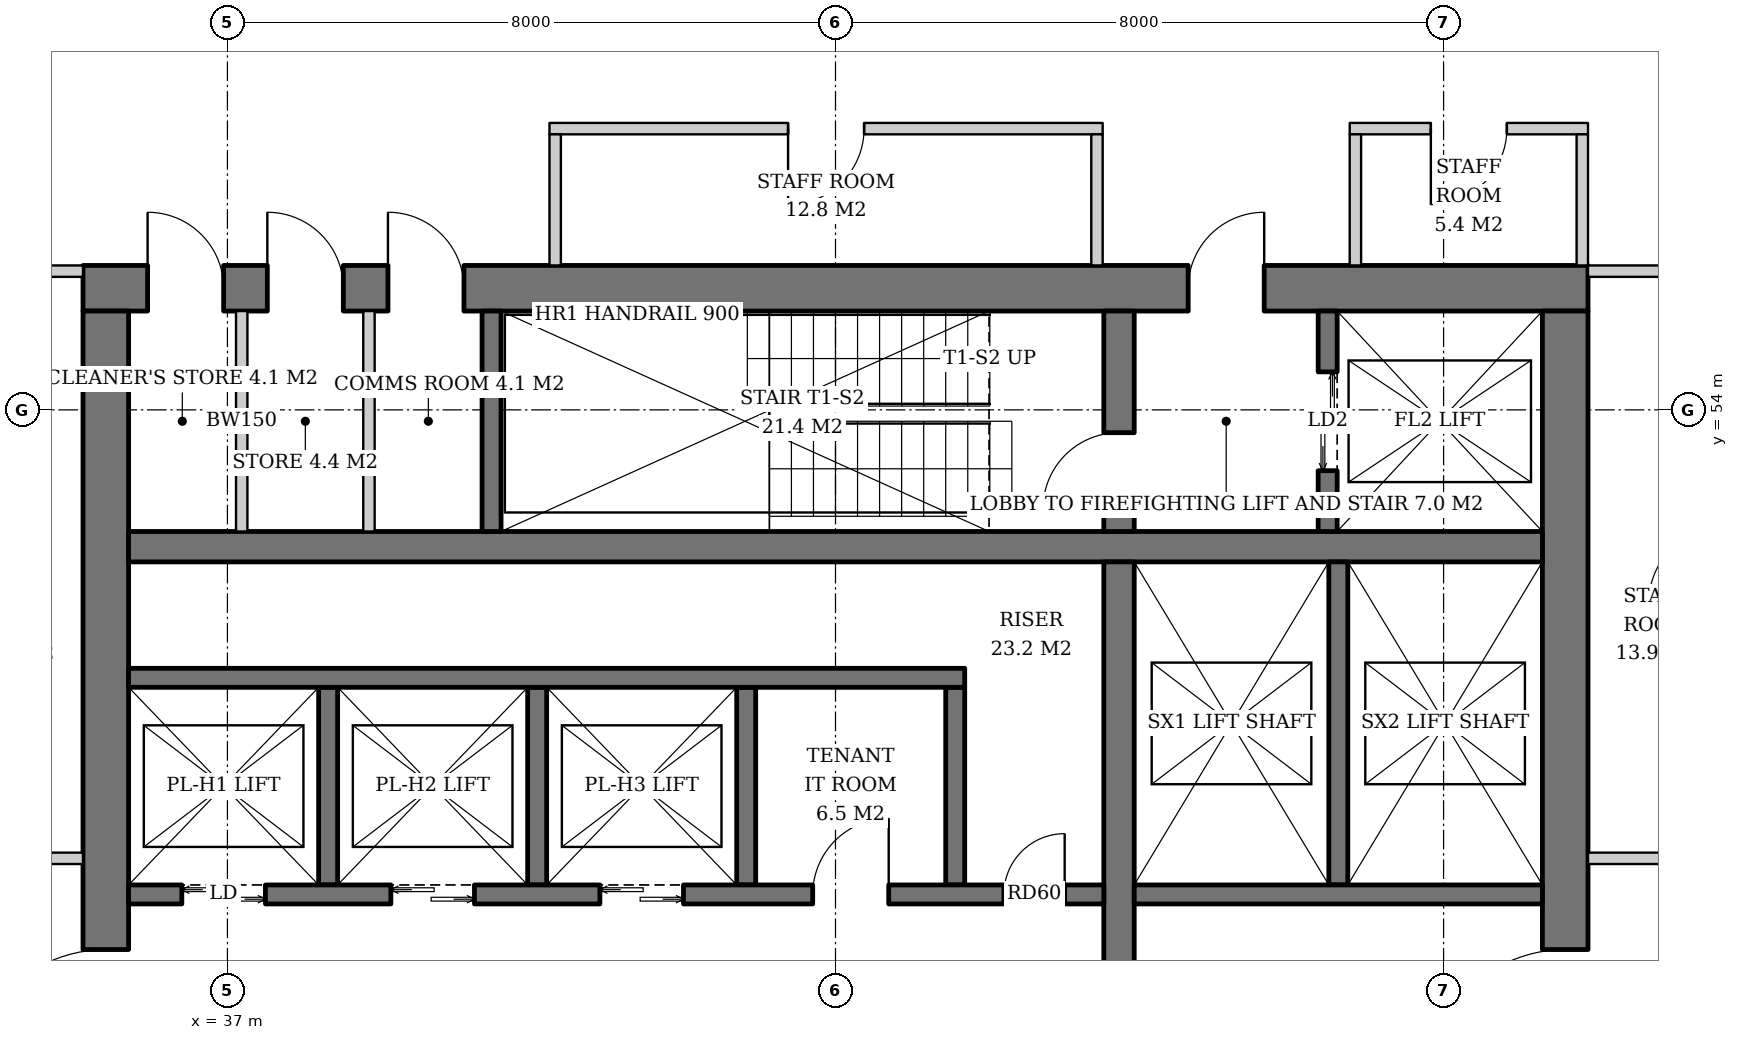
"""IFC4 building model, lengths in metres.
Left out: names, types, materials, properties, quantities, classifications, styles, units other than length and angle.
Written with IfcOpenShell. Run it as: python <this file> out.ifc"""

import sys

from ifc_helpers import new_model, si_unit, direction, frame, frame_2d, origin, place, context, subcontext, project, spatial, rectangle, extrude, element, fill, save


model = new_model("IFC4")
c1 = context("Model", 3, precision=1e-05, world=origin(), true_north=direction((0.0, 1.0)))
c2 = subcontext(c1, "Body", "Model", "MODEL_VIEW")
j1 = project(units=[si_unit("LENGTHUNIT", "METRE"), si_unit("PLANEANGLEUNIT", "RADIAN")], contexts=[c1])
p1 = place(None, origin())
s1 = spatial("IfcSite", under=j1, at=p1, CompositionType="ELEMENT")
p2 = place(p1, origin())
s2 = spatial("IfcBuilding", under=s1, at=p2, CompositionType="ELEMENT")
p3 = place(p2, frame((0.0, 0.0, 218.6)))
s3 = spatial("IfcBuildingStorey", under=s2, at=p3, CompositionType="ELEMENT", Elevation=218.6)
p4 = place(p3, frame((35.1, 55.6, 0.0), z_axis=(0.0, 0.0, 1.0), x_axis=(1.0, 0.0, 0.0)))
e1 = element("IfcWall", 1, at=p4, inside=s3, PredefinedType="SHEAR", context=c2, shape_type="SweptSolid", body=[
    extrude(rectangle(XDim=19.8, YDim=0.6, at=frame_2d((9.9, 0.0))), origin(), (0.0, 0.0, 1.0), 3.8),
])
p5 = place(p4, frame((14.54, 0.0, 0.0)))
e2 = element("IfcOpeningElement", 2, at=p5, cuts=e1, PredefinedType="OPENING", context=c2, shape_type="SweptSolid", body=[
    extrude(rectangle(XDim=1.0, YDim=2.1, at=frame_2d((0.5, 1.05))), frame((0.0, 0.31, 0.0), z_axis=(0.0, -1.0, 0.0), x_axis=(1.0, 0.0, 0.0)), (0.0, 0.0, 1.0), 0.62),
])
p6 = place(p4, frame((0.85, 0.0, 0.0)))
e3 = element("IfcOpeningElement", 3, at=p6, cuts=e1, PredefinedType="OPENING", context=c2, shape_type="SweptSolid", body=[
    extrude(rectangle(XDim=1.0, YDim=2.1, at=frame_2d((0.5, 1.05))), frame((0.0, 0.31, 0.0), z_axis=(0.0, -1.0, 0.0), x_axis=(1.0, 0.0, 0.0)), (0.0, 0.0, 1.0), 0.62),
])
p7 = place(p4, frame((2.425, 0.0, 0.0)))
e4 = element("IfcOpeningElement", 4, at=p7, cuts=e1, PredefinedType="OPENING", context=c2, shape_type="SweptSolid", body=[
    extrude(rectangle(XDim=1.0, YDim=2.1, at=frame_2d((0.5, 1.05))), frame((0.0, 0.31, 0.0), z_axis=(0.0, -1.0, 0.0), x_axis=(1.0, 0.0, 0.0)), (0.0, 0.0, 1.0), 0.62),
])
p8 = place(p4, frame((4.012, 0.0, 0.0)))
e5 = element("IfcOpeningElement", 5, at=p8, cuts=e1, PredefinedType="OPENING", context=c2, shape_type="SweptSolid", body=[
    extrude(rectangle(XDim=1.0, YDim=2.1, at=frame_2d((0.5, 1.05))), frame((0.0, 0.31, 0.0), z_axis=(0.0, -1.0, 0.0), x_axis=(1.0, 0.0, 0.0)), (0.0, 0.0, 1.0), 0.62),
])
p9 = place(p3, frame((35.4, 36.7, 0.0), z_axis=(0.0, 0.0, 1.0), x_axis=(0.0, 1.0, 0.0)))
e6 = element("IfcWall", 6, at=p9, inside=s3, PredefinedType="SHEAR", context=c2, shape_type="SweptSolid", body=[
    extrude(rectangle(XDim=18.6, YDim=0.6, at=frame_2d((9.3, 0.0))), origin(), (0.0, 0.0, 1.0), 3.8),
])
p10 = place(p9, frame((8.4, 0.0, 0.0)))
e7 = element("IfcOpeningElement", 7, at=p10, cuts=e6, PredefinedType="OPENING", context=c2, shape_type="SweptSolid", body=[
    extrude(rectangle(XDim=1.8, YDim=2.4, at=frame_2d((0.9, 1.2))), frame((0.0, 0.31, 0.0), z_axis=(0.0, -1.0, 0.0), x_axis=(1.0, 0.0, 0.0)), (0.0, 0.0, 1.0), 0.62),
])
p11 = place(p3, frame((54.6, 36.7, 0.0), z_axis=(0.0, 0.0, 1.0), x_axis=(0.0, 1.0, 0.0)))
e8 = element("IfcWall", 8, at=p11, inside=s3, PredefinedType="SHEAR", context=c2, shape_type="SweptSolid", body=[
    extrude(rectangle(XDim=18.6, YDim=0.6, at=frame_2d((9.3, 0.0))), origin(), (0.0, 0.0, 1.0), 3.8),
])
p12 = place(p11, frame((8.4, 0.0, 0.0)))
e9 = element("IfcOpeningElement", 9, at=p12, cuts=e8, PredefinedType="OPENING", context=c2, shape_type="SweptSolid", body=[
    extrude(rectangle(XDim=1.8, YDim=2.4, at=frame_2d((0.9, 1.2))), frame((0.0, 0.31, 0.0), z_axis=(0.0, -1.0, 0.0), x_axis=(1.0, 0.0, 0.0)), (0.0, 0.0, 1.0), 0.62),
])
p13 = place(p3, frame((35.7, 52.2, 0.0), z_axis=(0.0, 0.0, 1.0), x_axis=(1.0, 0.0, 0.0)))
e10 = element("IfcWall", 10, at=p13, inside=s3, PredefinedType="SHEAR", context=c2, shape_type="SweptSolid", body=[
    extrude(rectangle(XDim=18.6, YDim=0.4, at=frame_2d((9.3, 0.0))), origin(), (0.0, 0.0, 1.0), 3.8),
])
p14 = place(p3, frame((48.73, 40.0, 0.0), z_axis=(0.0, 0.0, 1.0), x_axis=(0.0, 1.0, 0.0)))
e11 = element("IfcWall", 11, at=p14, inside=s3, PredefinedType="SHEAR", context=c2, shape_type="SweptSolid", body=[
    extrude(rectangle(XDim=12.0, YDim=0.4, at=frame_2d((6.0, 0.0))), origin(), (0.0, 0.0, 1.0), 3.8),
])
p15 = place(p3, frame((48.73, 52.4, 0.0), z_axis=(0.0, 0.0, 1.0), x_axis=(0.0, 1.0, 0.0)))
e12 = element("IfcWall", 12, at=p15, inside=s3, PredefinedType="SHEAR", context=c2, shape_type="SweptSolid", body=[
    extrude(rectangle(XDim=2.9, YDim=0.4, at=frame_2d((1.45, 0.0))), origin(), (0.0, 0.0, 1.0), 3.8),
])
p16 = place(p15, frame((0.3, 0.0, 0.0)))
e13 = element("IfcOpeningElement", 13, at=p16, cuts=e12, PredefinedType="OPENING", context=c2, shape_type="SweptSolid", body=[
    extrude(rectangle(XDim=1.0, YDim=2.1, at=frame_2d((0.5, 1.05))), frame((0.0, 0.21, 0.0), z_axis=(0.0, -1.0, 0.0), x_axis=(1.0, 0.0, 0.0)), (0.0, 0.0, 1.0), 0.42),
])
p17 = place(p3, frame((40.475, 52.4, 0.0), z_axis=(0.0, 0.0, 1.0), x_axis=(0.0, 1.0, 0.0)))
e14 = element("IfcWall", 14, at=p17, inside=s3, PredefinedType="SHEAR", context=c2, shape_type="SweptSolid", body=[
    extrude(rectangle(XDim=2.9, YDim=0.25, at=frame_2d((1.45, 0.0))), origin(), (0.0, 0.0, 1.0), 3.8),
])
p18 = place(p3, frame((51.475, 52.4, 0.0), z_axis=(0.0, 0.0, 1.0), x_axis=(0.0, 1.0, 0.0)))
e15 = element("IfcWall", 15, at=p18, inside=s3, PredefinedType="SHEAR", context=c2, shape_type="SweptSolid", body=[
    extrude(rectangle(XDim=2.9, YDim=0.25, at=frame_2d((1.45, 0.0))), origin(), (0.0, 0.0, 1.0), 3.8),
])
p19 = place(p18, frame((0.8, 0.0, 0.0)))
e16 = element("IfcOpeningElement", 16, at=p19, cuts=e15, PredefinedType="OPENING", context=c2, shape_type="SweptSolid", body=[
    extrude(rectangle(XDim=1.3, YDim=2.2, at=frame_2d((0.65, 1.1))), frame((0.0, 0.135, 0.0), z_axis=(0.0, -1.0, 0.0), x_axis=(1.0, 0.0, 0.0)), (0.0, 0.0, 1.0), 0.27),
])
for number, where, z_axis, x_axis in (
    (17, (38.325, 47.75, 0.0), (0.0, 0.0, 1.0), (0.0, 1.0, 0.0)),
    (18, (41.075, 47.75, 0.0), (0.0, 0.0, 1.0), (0.0, 1.0, 0.0)),
    (19, (43.825, 47.75, 0.0), (0.0, 0.0, 1.0), (0.0, 1.0, 0.0)),
    (20, (46.575, 47.75, 0.0), (0.0, 0.0, 1.0), (0.0, 1.0, 0.0)),
):
    element("IfcWall", number, at=place(p3, frame(where, z_axis=z_axis, x_axis=x_axis)), inside=s3, PredefinedType="SHEAR", context=c2, shape_type="SweptSolid", body=[
        extrude(rectangle(XDim=2.6, YDim=0.25, at=frame_2d((1.3, 0.0))), origin(), (0.0, 0.0, 1.0), 3.8),
    ])
p20 = place(p3, frame((35.7, 50.475, 0.0), z_axis=(0.0, 0.0, 1.0), x_axis=(1.0, 0.0, 0.0)))
e21 = element("IfcWall", 21, at=p20, inside=s3, PredefinedType="SHEAR", context=c2, shape_type="SweptSolid", body=[
    extrude(rectangle(XDim=11.0, YDim=0.25, at=frame_2d((5.5, 0.0))), origin(), (0.0, 0.0, 1.0), 3.8),
])
p21 = place(p3, frame((35.7, 47.625, 0.0), z_axis=(0.0, 0.0, 1.0), x_axis=(1.0, 0.0, 0.0)))
e22 = element("IfcWall", 22, at=p21, inside=s3, PredefinedType="SHEAR", context=c2, shape_type="SweptSolid", body=[
    extrude(rectangle(XDim=12.83, YDim=0.25, at=frame_2d((6.415, 0.0))), origin(), (0.0, 0.0, 1.0), 3.8),
])
p22 = place(p21, frame((0.7, 0.0, 0.0)))
e23 = element("IfcOpeningElement", 23, at=p22, cuts=e22, PredefinedType="OPENING", context=c2, shape_type="SweptSolid", body=[
    extrude(rectangle(XDim=1.1, YDim=2.2, at=frame_2d((0.55, 1.1))), frame((0.0, 0.135, 0.0), z_axis=(0.0, -1.0, 0.0), x_axis=(1.0, 0.0, 0.0)), (0.0, 0.0, 1.0), 0.27),
])
p23 = place(p21, frame((3.45, 0.0, 0.0)))
e24 = element("IfcOpeningElement", 24, at=p23, cuts=e22, PredefinedType="OPENING", context=c2, shape_type="SweptSolid", body=[
    extrude(rectangle(XDim=1.1, YDim=2.2, at=frame_2d((0.55, 1.1))), frame((0.0, 0.135, 0.0), z_axis=(0.0, -1.0, 0.0), x_axis=(1.0, 0.0, 0.0)), (0.0, 0.0, 1.0), 0.27),
])
p24 = place(p21, frame((6.2, 0.0, 0.0)))
e25 = element("IfcOpeningElement", 25, at=p24, cuts=e22, PredefinedType="OPENING", context=c2, shape_type="SweptSolid", body=[
    extrude(rectangle(XDim=1.1, YDim=2.2, at=frame_2d((0.55, 1.1))), frame((0.0, 0.135, 0.0), z_axis=(0.0, -1.0, 0.0), x_axis=(1.0, 0.0, 0.0)), (0.0, 0.0, 1.0), 0.27),
])
p25 = place(p21, frame((9.0, 0.0, 0.0)))
e26 = element("IfcOpeningElement", 26, at=p25, cuts=e22, PredefinedType="OPENING", context=c2, shape_type="SweptSolid", body=[
    extrude(rectangle(XDim=1.0, YDim=2.1, at=frame_2d((0.5, 1.05))), frame((0.0, 0.135, 0.0), z_axis=(0.0, -1.0, 0.0), x_axis=(1.0, 0.0, 0.0)), (0.0, 0.0, 1.0), 0.27),
])
p26 = place(p21, frame((11.515, 0.0, 0.0)))
e27 = element("IfcOpeningElement", 27, at=p26, cuts=e22, PredefinedType="OPENING", context=c2, shape_type="SweptSolid", body=[
    extrude(rectangle(XDim=0.8, YDim=2.0, at=frame_2d((0.4, 1.0))), frame((0.0, 0.135, 0.0), z_axis=(0.0, -1.0, 0.0), x_axis=(1.0, 0.0, 0.0)), (0.0, 0.0, 1.0), 0.27),
])
p27 = place(p3, frame((51.615, 47.75, 0.0), z_axis=(0.0, 0.0, 1.0), x_axis=(0.0, 1.0, 0.0)))
e28 = element("IfcWall", 28, at=p27, inside=s3, PredefinedType="SHEAR", context=c2, shape_type="SweptSolid", body=[
    extrude(rectangle(XDim=4.25, YDim=0.25, at=frame_2d((2.125, 0.0))), origin(), (0.0, 0.0, 1.0), 3.8),
])
p28 = place(p3, frame((48.93, 47.625, 0.0), z_axis=(0.0, 0.0, 1.0), x_axis=(1.0, 0.0, 0.0)))
e29 = element("IfcWall", 29, at=p28, inside=s3, PredefinedType="SHEAR", context=c2, shape_type="SweptSolid", body=[
    extrude(rectangle(XDim=5.37, YDim=0.25, at=frame_2d((2.685, 0.0))), origin(), (0.0, 0.0, 1.0), 3.8),
])
for number, where, z_axis, x_axis in (
    (30, (37.188, 52.4, 0.0), (0.0, 0.0, 1.0), (0.0, 1.0, 0.0)),
    (31, (38.862, 52.4, 0.0), (0.0, 0.0, 1.0), (0.0, 1.0, 0.0)),
):
    element("IfcWall", number, at=place(p3, frame(where, z_axis=z_axis, x_axis=x_axis)), inside=s3, PredefinedType="SOLIDWALL", context=c2, shape_type="SweptSolid", body=[
        extrude(rectangle(XDim=2.9, YDim=0.15, at=frame_2d((1.45, 0.0))), origin(), (0.0, 0.0, 1.0), 3.62),
    ])
for number, where, z_axis, x_axis in (
    (32, (54.9, 48.1, 0.0), (0.0, 0.0, 1.0), (1.0, 0.0, 0.0)),
    (33, (54.9, 55.825, 0.0), (0.0, 0.0, 1.0), (1.0, 0.0, 0.0)),
):
    element("IfcWall", number, at=place(p3, frame(where, z_axis=z_axis, x_axis=x_axis)), inside=s3, PredefinedType="PARTITIONING", context=c2, shape_type="SweptSolid", body=[
        extrude(rectangle(XDim=1.725, YDim=0.15, at=frame_2d((0.863, 0.0))), origin(), (0.0, 0.0, 1.0), 3.62),
    ])
p29 = place(p3, frame((54.9, 57.7, 0.0), z_axis=(0.0, 0.0, 1.0), x_axis=(-1.0, 0.0, 0.0)))
e34 = element("IfcWall", 34, at=p29, inside=s3, PredefinedType="PARTITIONING", context=c2, shape_type="SweptSolid", body=[
    extrude(rectangle(XDim=3.135, YDim=0.15, at=frame_2d((1.567, 0.0))), origin(), (0.0, 0.0, 1.0), 2.92),
])
p30 = place(p29, frame((1.067, 0.0, 0.0)))
e35 = element("IfcOpeningElement", 35, at=p30, cuts=e34, PredefinedType="OPENING", context=c2, shape_type="SweptSolid", body=[
    extrude(rectangle(XDim=1.0, YDim=2.1, at=frame_2d((0.5, 1.05))), frame((0.0, 0.085, 0.0), z_axis=(0.0, -1.0, 0.0), x_axis=(1.0, 0.0, 0.0)), (0.0, 0.0, 1.0), 0.17),
])
p31 = place(p3, frame((54.825, 55.9, 0.0), z_axis=(0.0, 0.0, 1.0), x_axis=(0.0, 1.0, 0.0)))
e36 = element("IfcWall", 36, at=p31, inside=s3, PredefinedType="PARTITIONING", context=c2, shape_type="SweptSolid", body=[
    extrude(rectangle(XDim=1.725, YDim=0.15, at=frame_2d((0.863, 0.0))), origin(), (0.0, 0.0, 1.0), 2.92),
])
p32 = place(p3, frame((51.84, 55.9, 0.0), z_axis=(0.0, 0.0, 1.0), x_axis=(0.0, 1.0, 0.0)))
e37 = element("IfcWall", 37, at=p32, inside=s3, PredefinedType="PARTITIONING", context=c2, shape_type="SweptSolid", body=[
    extrude(rectangle(XDim=1.725, YDim=0.15, at=frame_2d((0.863, 0.0))), origin(), (0.0, 0.0, 1.0), 3.62),
])
p33 = place(p3, frame((48.515, 57.7, 0.0), z_axis=(0.0, 0.0, 1.0), x_axis=(-1.0, 0.0, 0.0)))
e38 = element("IfcWall", 38, at=p33, inside=s3, PredefinedType="PARTITIONING", context=c2, shape_type="SweptSolid", body=[
    extrude(rectangle(XDim=7.278, YDim=0.15, at=frame_2d((3.639, 0.0))), origin(), (0.0, 0.0, 1.0), 2.867),
])
p34 = place(p33, frame((3.139, 0.0, 0.0)))
e39 = element("IfcOpeningElement", 39, at=p34, cuts=e38, PredefinedType="OPENING", context=c2, shape_type="SweptSolid", body=[
    extrude(rectangle(XDim=1.0, YDim=2.1, at=frame_2d((0.5, 1.05))), frame((0.0, 0.085, 0.0), z_axis=(0.0, -1.0, 0.0), x_axis=(1.0, 0.0, 0.0)), (0.0, 0.0, 1.0), 0.17),
])
for number, where, z_axis, x_axis in (
    (40, (48.44, 55.9, 0.0), (0.0, 0.0, 1.0), (0.0, 1.0, 0.0)),
    (41, (41.312, 55.9, 0.0), (0.0, 0.0, 1.0), (0.0, 1.0, 0.0)),
):
    element("IfcWall", number, at=place(p3, frame(where, z_axis=z_axis, x_axis=x_axis)), inside=s3, PredefinedType="PARTITIONING", context=c2, shape_type="SweptSolid", body=[
        extrude(rectangle(XDim=1.725, YDim=0.15, at=frame_2d((0.863, 0.0))), origin(), (0.0, 0.0, 1.0), 3.62),
    ])
p35 = place(p3, frame((35.1, 55.825, 0.0), z_axis=(0.0, 0.0, 1.0), x_axis=(-1.0, 0.0, 0.0)))
e42 = element("IfcWall", 42, at=p35, inside=s3, PredefinedType="PARTITIONING", context=c2, shape_type="SweptSolid", body=[
    extrude(rectangle(XDim=1.725, YDim=0.15, at=frame_2d((0.863, 0.0))), origin(), (0.0, 0.0, 1.0), 2.92),
])
p36 = place(p3, frame((35.1, 48.1, 0.0), z_axis=(0.0, 0.0, 1.0), x_axis=(-1.0, 0.0, 0.0)))
e43 = element("IfcWall", 43, at=p36, inside=s3, PredefinedType="PARTITIONING", context=c2, shape_type="SweptSolid", body=[
    extrude(rectangle(XDim=1.725, YDim=0.15, at=frame_2d((0.863, 0.0))), origin(), (0.0, 0.0, 1.0), 3.62),
])
p37 = place(p19, origin())
e44 = element("IfcDoor", 44, at=p37, inside=s3, OperationType="DOUBLE_DOOR_SLIDING", PredefinedType="DOOR", context=c2, shape_type="SweptSolid", body=[
    extrude(rectangle(XDim=1.3, YDim=2.2, at=frame_2d((0.65, 1.1))), frame((0.0, 0.025, 0.0), z_axis=(0.0, -1.0, 0.0), x_axis=(1.0, 0.0, 0.0)), (0.0, 0.0, 1.0), 0.05),
])
fill(e16, e44)
p38 = place(p22, origin())
e45 = element("IfcDoor", 45, at=p38, inside=s3, OperationType="DOUBLE_DOOR_SLIDING", PredefinedType="DOOR", context=c2, shape_type="SweptSolid", body=[
    extrude(rectangle(XDim=1.1, YDim=2.2, at=frame_2d((0.55, 1.1))), frame((0.0, 0.025, 0.0), z_axis=(0.0, -1.0, 0.0), x_axis=(1.0, 0.0, 0.0)), (0.0, 0.0, 1.0), 0.05),
])
fill(e23, e45)
p39 = place(p23, origin())
e46 = element("IfcDoor", 46, at=p39, inside=s3, OperationType="DOUBLE_DOOR_SLIDING", PredefinedType="DOOR", context=c2, shape_type="SweptSolid", body=[
    extrude(rectangle(XDim=1.1, YDim=2.2, at=frame_2d((0.55, 1.1))), frame((0.0, 0.025, 0.0), z_axis=(0.0, -1.0, 0.0), x_axis=(1.0, 0.0, 0.0)), (0.0, 0.0, 1.0), 0.05),
])
fill(e24, e46)
p40 = place(p24, origin())
e47 = element("IfcDoor", 47, at=p40, inside=s3, OperationType="DOUBLE_DOOR_SLIDING", PredefinedType="DOOR", context=c2, shape_type="SweptSolid", body=[
    extrude(rectangle(XDim=1.1, YDim=2.2, at=frame_2d((0.55, 1.1))), frame((0.0, 0.025, 0.0), z_axis=(0.0, -1.0, 0.0), x_axis=(1.0, 0.0, 0.0)), (0.0, 0.0, 1.0), 0.05),
])
fill(e25, e47)
p41 = place(p25, origin())
e48 = element("IfcDoor", 48, at=p41, inside=s3, OperationType="SINGLE_SWING_RIGHT", PredefinedType="DOOR", context=c2, shape_type="SweptSolid", body=[
    extrude(rectangle(XDim=1.0, YDim=2.1, at=frame_2d((0.5, 1.05))), frame((0.0, 0.025, 0.0), z_axis=(0.0, -1.0, 0.0), x_axis=(1.0, 0.0, 0.0)), (0.0, 0.0, 1.0), 0.05),
])
fill(e26, e48)
p42 = place(p26, origin())
e49 = element("IfcDoor", 49, at=p42, inside=s3, OperationType="SINGLE_SWING_RIGHT", PredefinedType="DOOR", context=c2, shape_type="SweptSolid", body=[
    extrude(rectangle(XDim=0.8, YDim=2.0, at=frame_2d((0.4, 1.0))), frame((0.0, 0.025, 0.0), z_axis=(0.0, -1.0, 0.0), x_axis=(1.0, 0.0, 0.0)), (0.0, 0.0, 1.0), 0.05),
])
fill(e27, e49)
p43 = place(p16, origin())
e50 = element("IfcDoor", 50, at=p43, inside=s3, OperationType="SINGLE_SWING_LEFT", PredefinedType="DOOR", context=c2, shape_type="SweptSolid", body=[
    extrude(rectangle(XDim=1.0, YDim=2.1, at=frame_2d((0.5, 1.05))), frame((0.0, 0.025, 0.0), z_axis=(0.0, -1.0, 0.0), x_axis=(1.0, 0.0, 0.0)), (0.0, 0.0, 1.0), 0.05),
])
fill(e13, e50)
p44 = place(p5, origin())
e51 = element("IfcDoor", 51, at=p44, inside=s3, OperationType="SINGLE_SWING_RIGHT", PredefinedType="DOOR", context=c2, shape_type="SweptSolid", body=[
    extrude(rectangle(XDim=1.0, YDim=2.1, at=frame_2d((0.5, 1.05))), frame((0.0, 0.025, 0.0), z_axis=(0.0, -1.0, 0.0), x_axis=(1.0, 0.0, 0.0)), (0.0, 0.0, 1.0), 0.05),
])
fill(e2, e51)
p45 = place(p10, origin())
e52 = element("IfcDoor", 52, at=p45, inside=s3, OperationType="DOUBLE_DOOR_SINGLE_SWING", PredefinedType="DOOR", context=c2, shape_type="SweptSolid", body=[
    extrude(rectangle(XDim=1.8, YDim=2.4, at=frame_2d((0.9, 1.2))), frame((0.0, 0.025, 0.0), z_axis=(0.0, -1.0, 0.0), x_axis=(1.0, 0.0, 0.0)), (0.0, 0.0, 1.0), 0.05),
])
fill(e7, e52)
p46 = place(p12, origin())
e53 = element("IfcDoor", 53, at=p46, inside=s3, OperationType="DOUBLE_DOOR_SINGLE_SWING", PredefinedType="DOOR", context=c2, shape_type="SweptSolid", body=[
    extrude(rectangle(XDim=1.8, YDim=2.4, at=frame_2d((0.9, 1.2))), frame((0.0, 0.025, 0.0), z_axis=(0.0, -1.0, 0.0), x_axis=(1.0, 0.0, 0.0)), (0.0, 0.0, 1.0), 0.05),
])
fill(e9, e53)
p47 = place(p6, origin())
e54 = element("IfcDoor", 54, at=p47, inside=s3, OperationType="SINGLE_SWING_LEFT", PredefinedType="DOOR", context=c2, shape_type="SweptSolid", body=[
    extrude(rectangle(XDim=1.0, YDim=2.1, at=frame_2d((0.5, 1.05))), frame((0.0, -0.24, 0.0), z_axis=(0.0, -1.0, 0.0), x_axis=(1.0, 0.0, 0.0)), (0.0, 0.0, 1.0), 0.05),
])
fill(e3, e54)
p48 = place(p7, origin())
e55 = element("IfcDoor", 55, at=p48, inside=s3, OperationType="SINGLE_SWING_LEFT", PredefinedType="DOOR", context=c2, shape_type="SweptSolid", body=[
    extrude(rectangle(XDim=1.0, YDim=2.1, at=frame_2d((0.5, 1.05))), frame((0.0, -0.24, 0.0), z_axis=(0.0, -1.0, 0.0), x_axis=(1.0, 0.0, 0.0)), (0.0, 0.0, 1.0), 0.05),
])
fill(e4, e55)
p49 = place(p8, origin())
e56 = element("IfcDoor", 56, at=p49, inside=s3, OperationType="SINGLE_SWING_LEFT", PredefinedType="DOOR", context=c2, shape_type="SweptSolid", body=[
    extrude(rectangle(XDim=1.0, YDim=2.1, at=frame_2d((0.5, 1.05))), frame((0.0, -0.24, 0.0), z_axis=(0.0, -1.0, 0.0), x_axis=(1.0, 0.0, 0.0)), (0.0, 0.0, 1.0), 0.05),
])
fill(e5, e56)
p50 = place(p30, origin())
e57 = element("IfcDoor", 57, at=p50, inside=s3, OperationType="SINGLE_SWING_RIGHT", PredefinedType="DOOR", context=c2, shape_type="SweptSolid", body=[
    extrude(rectangle(XDim=1.0, YDim=2.1, at=frame_2d((0.5, 1.05))), frame((0.0, 0.025, 0.0), z_axis=(0.0, -1.0, 0.0), x_axis=(1.0, 0.0, 0.0)), (0.0, 0.0, 1.0), 0.05),
])
fill(e35, e57)
p51 = place(p34, origin())
e58 = element("IfcDoor", 58, at=p51, inside=s3, OperationType="SINGLE_SWING_RIGHT", PredefinedType="DOOR", context=c2, shape_type="SweptSolid", body=[
    extrude(rectangle(XDim=1.0, YDim=2.1, at=frame_2d((0.5, 1.05))), frame((0.0, 0.025, 0.0), z_axis=(0.0, -1.0, 0.0), x_axis=(1.0, 0.0, 0.0)), (0.0, 0.0, 1.0), 0.05),
])
fill(e39, e58)
save(model, sys.argv[1])
